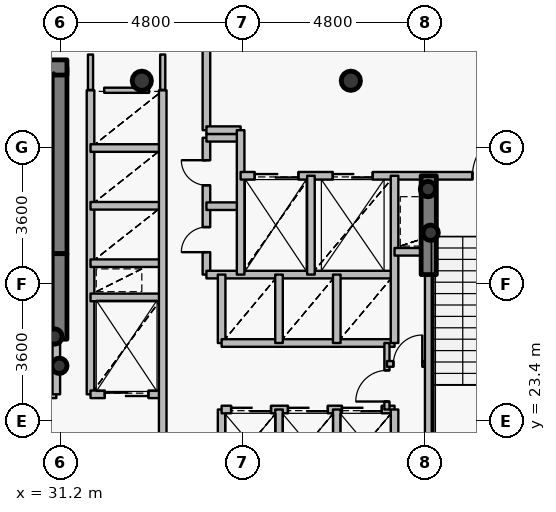
"""IFC4 building model, lengths in metres.
Left out: names, types, materials, properties, quantities, classifications, styles, units other than length and angle.
Written with IfcOpenShell. Run it as: python <this file> out.ifc"""

import sys

from ifc_helpers import new_model, si_unit, direction, frame, frame_2d, origin, origin_2d, place, context, subcontext, project, spatial, rectangle, hollow_circle, extrude, source, transform, mapped, element, fill, save


model = new_model("IFC4")
c1 = context("Model", 3, precision=1e-05, world=origin(), true_north=direction((0.0, 1.0)))
c2 = subcontext(c1, "Body", "Model", "MODEL_VIEW")
j1 = project(units=[si_unit("LENGTHUNIT", "METRE"), si_unit("PLANEANGLEUNIT", "RADIAN")], contexts=[c1])
p1 = place(None, origin())
s1 = spatial("IfcSite", under=j1, at=p1, CompositionType="ELEMENT")
p2 = place(p1, origin())
s2 = spatial("IfcBuilding", under=s1, at=p2, CompositionType="ELEMENT")
p3 = place(p2, frame((0.0, 0.0, 45.0)))
s3 = spatial("IfcBuildingStorey", under=s2, at=p3, CompositionType="ELEMENT", Elevation=45.0)
for number, where, z_axis, x_axis in (
    (1, (38.85, 32.35, 0.0), (0.0, 0.0, 1.0), (1.0, 0.0, 0.0)),
    (2, (33.35, 32.35, 0.0), (0.0, 0.0, 1.0), (1.0, 0.0, 0.0)),
):
    element("IfcColumn", number, at=place(p3, frame(where, z_axis=z_axis, x_axis=x_axis)), inside=s3, PredefinedType="COLUMN", context=c2, shape_type="SweptSolid", body=[
        extrude(hollow_circle(Radius=0.254, WallThickness=0.02, at=origin_2d()), origin(), (0.0, 0.0, 1.0), 4.2),
    ])
p4 = place(p3, frame((31.18, 27.8, 0.0), z_axis=(0.0, 0.0, 1.0), x_axis=(0.0, 1.0, 0.0)))
e3 = element("IfcWall", 3, at=p4, inside=s3, PredefinedType="SHEAR", context=c2, shape_type="SweptSolid", body=[
    extrude(rectangle(XDim=4.9, YDim=0.4, at=frame_2d((2.45, 0.0))), origin(), (0.0, 0.0, 1.0), 4.2),
])
p5 = place(p3, frame((27.28, 32.7, 0.0), z_axis=(0.0, 0.0, 1.0), x_axis=(1.0, 0.0, 0.0)))
e4 = element("IfcWall", 4, at=p5, inside=s3, PredefinedType="SHEAR", context=c2, shape_type="SweptSolid", body=[
    extrude(rectangle(XDim=4.1, YDim=0.4, at=frame_2d((2.05, 0.0))), origin(), (0.0, 0.0, 1.0), 4.2),
])
for number, where, z_axis, x_axis in (
    (5, (31.05, 25.62, 0.0), (0.0, 0.0, 1.0), (1.0, 0.0, 0.0)),
    (6, (31.18, 24.85, 0.0), (0.0, 0.0, 1.0), (1.0, 0.0, 0.0)),
    (7, (40.95, 28.35, 0.0), (0.0, 0.0, 1.0), (1.0, 0.0, 0.0)),
    (8, (40.88, 29.5, 0.0), (0.0, 0.0, 1.0), (1.0, 0.0, 0.0)),
):
    element("IfcColumn", number, at=place(p3, frame(where, z_axis=z_axis, x_axis=x_axis)), inside=s3, PredefinedType="COLUMN", context=c2, shape_type="SweptSolid", body=[
        extrude(hollow_circle(Radius=0.203, WallThickness=0.016, at=origin_2d()), origin(), (0.0, 0.0, 1.0), 4.2),
    ])
p6 = place(p3, frame((31.18, 25.55, 0.0), z_axis=(0.0, 0.0, 1.0), x_axis=(0.0, 1.0, 0.0)))
e9 = element("IfcWall", 9, at=p6, inside=s3, PredefinedType="SHEAR", context=c2, shape_type="SweptSolid", body=[
    extrude(rectangle(XDim=2.25, YDim=0.4, at=frame_2d((1.125, 0.0))), origin(), (0.0, 0.0, 1.0), 3.55),
])
p7 = place(p3, frame((40.9, 27.25, 0.0), z_axis=(0.0, 0.0, 1.0), x_axis=(0.0, 1.0, 0.0)))
e10 = element("IfcWall", 10, at=p7, inside=s3, PredefinedType="SHEAR", context=c2, shape_type="SweptSolid", body=[
    extrude(rectangle(XDim=2.6, YDim=0.4, at=frame_2d((1.3, 0.0))), origin(), (0.0, 0.0, 1.0), 3.55),
])
p8 = place(p3, frame((27.56, 24.1, 0.0), z_axis=(0.0, 0.0, 1.0), x_axis=(1.0, 0.0, 0.0)))
e11 = element("IfcWall", 11, at=p8, inside=s3, PredefinedType="PARTITIONING", context=c2, shape_type="SweptSolid", body=[
    extrude(rectangle(XDim=3.54, YDim=0.2, at=frame_2d((1.77, 0.0))), origin(), (0.0, 0.0, 1.0), 3.95),
])
p9 = place(p8, frame((1.17, 0.0, 0.0)))
e12 = element("IfcOpeningElement", 12, at=p9, cuts=e11, PredefinedType="OPENING", context=c2, shape_type="SweptSolid", body=[
    extrude(rectangle(XDim=1.2, YDim=2.15, at=origin_2d()), frame((0.6, 0.11, 1.075), z_axis=(0.0, -1.0, 0.0), x_axis=(1.0, 0.0, 0.0)), (0.0, 0.0, 1.0), 0.22),
])
p10 = place(p3, frame((31.1, 24.1, 0.0), z_axis=(0.0, 0.0, 1.0), x_axis=(0.0, 1.0, 0.0)))
e13 = element("IfcWall", 13, at=p10, inside=s3, PredefinedType="PARTITIONING", context=c2, shape_type="SweptSolid", body=[
    extrude(rectangle(XDim=1.44, YDim=0.2, at=frame_2d((0.72, 0.0))), origin(), (0.0, 0.0, 1.0), 3.95),
])
p11 = place(p3, frame((32.0, 24.1, 0.0), z_axis=(0.0, 0.0, 1.0), x_axis=(0.0, 1.0, 0.0)))
e14 = element("IfcWall", 14, at=p11, inside=s3, PredefinedType="PARTITIONING", context=c2, shape_type="SweptSolid", body=[
    extrude(rectangle(XDim=8.0, YDim=0.2, at=frame_2d((4.0, 0.0))), origin(), (0.0, 0.0, 1.0), 3.95),
])
p12 = place(p3, frame((32.0, 24.1, 0.0), z_axis=(0.0, 0.0, 1.0), x_axis=(1.0, 0.0, 0.0)))
e15 = element("IfcWall", 15, at=p12, inside=s3, PredefinedType="PARTITIONING", context=c2, shape_type="SweptSolid", body=[
    extrude(rectangle(XDim=1.9, YDim=0.2, at=frame_2d((0.95, 0.0))), origin(), (0.0, 0.0, 1.0), 3.535),
])
p13 = place(p12, frame((0.375, 0.0, 0.0)))
e16 = element("IfcOpeningElement", 16, at=p13, cuts=e15, PredefinedType="OPENING", context=c2, shape_type="SweptSolid", body=[
    extrude(rectangle(XDim=1.15, YDim=2.15, at=origin_2d()), frame((0.575, 0.11, 1.075), z_axis=(0.0, -1.0, 0.0), x_axis=(1.0, 0.0, 0.0)), (0.0, 0.0, 1.0), 0.22),
])
for number, where, z_axis, x_axis in (
    (17, (32.0, 26.65, 0.0), (0.0, 0.0, 1.0), (1.0, 0.0, 0.0)),
    (18, (32.0, 27.55, 0.0), (0.0, 0.0, 1.0), (1.0, 0.0, 0.0)),
    (19, (32.0, 29.06, 0.0), (0.0, 0.0, 1.0), (1.0, 0.0, 0.0)),
    (20, (32.0, 30.58, 0.0), (0.0, 0.0, 1.0), (1.0, 0.0, 0.0)),
):
    element("IfcWall", number, at=place(p3, frame(where, z_axis=z_axis, x_axis=x_axis)), inside=s3, PredefinedType="PARTITIONING", context=c2, shape_type="SweptSolid", body=[
        extrude(rectangle(XDim=1.9, YDim=0.2, at=frame_2d((0.95, 0.0))), origin(), (0.0, 0.0, 1.0), 3.535),
    ])
p14 = place(p3, frame((33.9, 20.7, 0.0), z_axis=(0.0, 0.0, 1.0), x_axis=(0.0, 1.0, 0.0)))
e21 = element("IfcWall", 21, at=p14, inside=s3, PredefinedType="PARTITIONING", context=c2, shape_type="SweptSolid", body=[
    extrude(rectangle(XDim=11.4, YDim=0.2, at=frame_2d((5.7, 0.0))), origin(), (0.0, 0.0, 1.0), 3.535),
])
p15 = place(p3, frame((35.05, 27.25, 0.0), z_axis=(0.0, 0.0, 1.0), x_axis=(0.0, 1.0, 0.0)))
e22 = element("IfcWall", 22, at=p15, inside=s3, PredefinedType="PARTITIONING", context=c2, shape_type="SweptSolid", body=[
    extrude(rectangle(XDim=3.6, YDim=0.2, at=frame_2d((1.8, 0.0))), origin(), (0.0, 0.0, 1.0), 3.95),
])
p16 = place(p15, frame((0.59, 0.0, 0.0)))
e23 = element("IfcOpeningElement", 23, at=p16, cuts=e22, PredefinedType="OPENING", context=c2, shape_type="SweptSolid", body=[
    extrude(rectangle(XDim=0.66, YDim=2.05, at=origin_2d()), frame((0.33, 0.11, 1.025), z_axis=(0.0, -1.0, 0.0), x_axis=(1.0, 0.0, 0.0)), (0.0, 0.0, 1.0), 0.22),
])
p17 = place(p15, frame((2.35, 0.0, 0.0)))
e24 = element("IfcOpeningElement", 24, at=p17, cuts=e22, PredefinedType="OPENING", context=c2, shape_type="SweptSolid", body=[
    extrude(rectangle(XDim=0.66, YDim=2.05, at=origin_2d()), frame((0.33, 0.11, 1.025), z_axis=(0.0, -1.0, 0.0), x_axis=(1.0, 0.0, 0.0)), (0.0, 0.0, 1.0), 0.22),
])
p18 = place(p3, frame((35.05, 27.25, 0.0), z_axis=(0.0, 0.0, 1.0), x_axis=(1.0, 0.0, 0.0)))
e25 = element("IfcWall", 25, at=p18, inside=s3, PredefinedType="PARTITIONING", context=c2, shape_type="SweptSolid", body=[
    extrude(rectangle(XDim=4.95, YDim=0.2, at=frame_2d((2.475, 0.0))), origin(), (0.0, 0.0, 1.0), 3.535),
])
for number, where, z_axis, x_axis in (
    (26, (35.05, 29.05, 0.0), (0.0, 0.0, 1.0), (1.0, 0.0, 0.0)),
    (27, (35.05, 30.85, 0.0), (0.0, 0.0, 1.0), (1.0, 0.0, 0.0)),
):
    element("IfcWall", number, at=place(p3, frame(where, z_axis=z_axis, x_axis=x_axis)), inside=s3, PredefinedType="PARTITIONING", context=c2, shape_type="SweptSolid", body=[
        extrude(rectangle(XDim=0.9, YDim=0.2, at=frame_2d((0.45, 0.0))), origin(), (0.0, 0.0, 1.0), 3.95),
    ])
p19 = place(p3, frame((35.05, 31.05, 0.0), z_axis=(0.0, 0.0, 1.0), x_axis=(0.0, 1.0, 0.0)))
e28 = element("IfcWall", 28, at=p19, inside=s3, PredefinedType="PARTITIONING", context=c2, shape_type="SweptSolid", body=[
    extrude(rectangle(XDim=2.25, YDim=0.2, at=frame_2d((1.125, 0.0))), origin(), (0.0, 0.0, 1.0), 3.535),
])
p20 = place(p3, frame((35.05, 31.05, 0.0), z_axis=(0.0, 0.0, 1.0), x_axis=(1.0, 0.0, 0.0)))
e29 = element("IfcWall", 29, at=p20, inside=s3, PredefinedType="PARTITIONING", context=c2, shape_type="SweptSolid", body=[
    extrude(rectangle(XDim=0.9, YDim=0.2, at=frame_2d((0.45, 0.0))), origin(), (0.0, 0.0, 1.0), 3.95),
])
p21 = place(p3, frame((35.45, 21.9, 0.0), z_axis=(0.0, 0.0, 1.0), x_axis=(0.0, 1.0, 0.0)))
e30 = element("IfcWall", 30, at=p21, inside=s3, PredefinedType="PARTITIONING", context=c2, shape_type="SweptSolid", body=[
    extrude(rectangle(XDim=1.8, YDim=0.2, at=frame_2d((0.9, 0.0))), origin(), (0.0, 0.0, 1.0), 3.95),
])
p22 = place(p3, frame((35.45, 23.7, 0.0), z_axis=(0.0, 0.0, 1.0), x_axis=(1.0, 0.0, 0.0)))
e31 = element("IfcWall", 31, at=p22, inside=s3, PredefinedType="PARTITIONING", context=c2, shape_type="SweptSolid", body=[
    extrude(rectangle(XDim=4.55, YDim=0.2, at=frame_2d((2.275, 0.0))), origin(), (0.0, 0.0, 1.0), 3.535),
])
p23 = place(p22, frame((0.25, 0.0, 0.0)))
e32 = element("IfcOpeningElement", 32, at=p23, cuts=e31, PredefinedType="OPENING", context=c2, shape_type="SweptSolid", body=[
    extrude(rectangle(XDim=1.05, YDim=2.15, at=origin_2d()), frame((0.525, 0.11, 1.075), z_axis=(0.0, -1.0, 0.0), x_axis=(1.0, 0.0, 0.0)), (0.0, 0.0, 1.0), 0.22),
])
p24 = place(p22, frame((1.745, 0.0, 0.0)))
e33 = element("IfcOpeningElement", 33, at=p24, cuts=e31, PredefinedType="OPENING", context=c2, shape_type="SweptSolid", body=[
    extrude(rectangle(XDim=1.05, YDim=2.15, at=origin_2d()), frame((0.525, 0.11, 1.075), z_axis=(0.0, -1.0, 0.0), x_axis=(1.0, 0.0, 0.0)), (0.0, 0.0, 1.0), 0.22),
])
p25 = place(p22, frame((3.165, 0.0, 0.0)))
e34 = element("IfcOpeningElement", 34, at=p25, cuts=e31, PredefinedType="OPENING", context=c2, shape_type="SweptSolid", body=[
    extrude(rectangle(XDim=1.05, YDim=2.15, at=origin_2d()), frame((0.525, 0.11, 1.075), z_axis=(0.0, -1.0, 0.0), x_axis=(1.0, 0.0, 0.0)), (0.0, 0.0, 1.0), 0.22),
])
p26 = place(p3, frame((35.45, 25.45, 0.0), z_axis=(0.0, 0.0, 1.0), x_axis=(0.0, 1.0, 0.0)))
e35 = element("IfcWall", 35, at=p26, inside=s3, PredefinedType="PARTITIONING", context=c2, shape_type="SweptSolid", body=[
    extrude(rectangle(XDim=1.8, YDim=0.2, at=frame_2d((0.9, 0.0))), origin(), (0.0, 0.0, 1.0), 3.95),
])
p27 = place(p3, frame((35.45, 25.45, 0.0), z_axis=(0.0, 0.0, 1.0), x_axis=(1.0, 0.0, 0.0)))
e36 = element("IfcWall", 36, at=p27, inside=s3, PredefinedType="PARTITIONING", context=c2, shape_type="SweptSolid", body=[
    extrude(rectangle(XDim=4.55, YDim=0.2, at=frame_2d((2.275, 0.0))), origin(), (0.0, 0.0, 1.0), 3.535),
])
p28 = place(p3, frame((35.95, 27.25, 0.0), z_axis=(0.0, 0.0, 1.0), x_axis=(0.0, 1.0, 0.0)))
e37 = element("IfcWall", 37, at=p28, inside=s3, PredefinedType="PARTITIONING", context=c2, shape_type="SweptSolid", body=[
    extrude(rectangle(XDim=3.8, YDim=0.2, at=frame_2d((1.9, 0.0))), origin(), (0.0, 0.0, 1.0), 3.95),
])
p29 = place(p3, frame((35.95, 29.85, 0.0), z_axis=(0.0, 0.0, 1.0), x_axis=(1.0, 0.0, 0.0)))
e38 = element("IfcWall", 38, at=p29, inside=s3, PredefinedType="PARTITIONING", context=c2, shape_type="SweptSolid", body=[
    extrude(rectangle(XDim=8.49, YDim=0.2, at=frame_2d((4.245, 0.0))), origin(), (0.0, 0.0, 1.0), 3.535),
])
p30 = place(p29, frame((6.1, 0.0, 0.0)))
e39 = element("IfcOpeningElement", 39, at=p30, cuts=e38, PredefinedType="OPENING", context=c2, shape_type="SweptSolid", body=[
    extrude(rectangle(XDim=1.2, YDim=2.15, at=origin_2d()), frame((0.6, 0.11, 1.075), z_axis=(0.0, -1.0, 0.0), x_axis=(1.0, 0.0, 0.0)), (0.0, 0.0, 1.0), 0.22),
])
p31 = place(p29, frame((0.37, 0.0, 0.0)))
e40 = element("IfcOpeningElement", 40, at=p31, cuts=e38, PredefinedType="OPENING", context=c2, shape_type="SweptSolid", body=[
    extrude(rectangle(XDim=1.15, YDim=2.15, at=origin_2d()), frame((0.575, 0.11, 1.075), z_axis=(0.0, -1.0, 0.0), x_axis=(1.0, 0.0, 0.0)), (0.0, 0.0, 1.0), 0.22),
])
p32 = place(p29, frame((2.425, 0.0, 0.0)))
e41 = element("IfcOpeningElement", 41, at=p32, cuts=e38, PredefinedType="OPENING", context=c2, shape_type="SweptSolid", body=[
    extrude(rectangle(XDim=1.05, YDim=2.15, at=origin_2d()), frame((0.525, 0.11, 1.075), z_axis=(0.0, -1.0, 0.0), x_axis=(1.0, 0.0, 0.0)), (0.0, 0.0, 1.0), 0.22),
])
for number, where, z_axis, x_axis in (
    (42, (36.96, 21.9, 0.0), (0.0, 0.0, 1.0), (0.0, 1.0, 0.0)),
    (43, (36.96, 25.45, 0.0), (0.0, 0.0, 1.0), (0.0, 1.0, 0.0)),
):
    element("IfcWall", number, at=place(p3, frame(where, z_axis=z_axis, x_axis=x_axis)), inside=s3, PredefinedType="PARTITIONING", context=c2, shape_type="SweptSolid", body=[
        extrude(rectangle(XDim=1.8, YDim=0.2, at=frame_2d((0.9, 0.0))), origin(), (0.0, 0.0, 1.0), 3.95),
    ])
p33 = place(p3, frame((37.8, 27.25, 0.0), z_axis=(0.0, 0.0, 1.0), x_axis=(0.0, 1.0, 0.0)))
e44 = element("IfcWall", 44, at=p33, inside=s3, PredefinedType="PARTITIONING", context=c2, shape_type="SweptSolid", body=[
    extrude(rectangle(XDim=2.6, YDim=0.2, at=frame_2d((1.3, 0.0))), origin(), (0.0, 0.0, 1.0), 3.95),
])
for number, where, z_axis, x_axis in (
    (45, (38.48, 21.9, 0.0), (0.0, 0.0, 1.0), (0.0, 1.0, 0.0)),
    (46, (38.48, 25.45, 0.0), (0.0, 0.0, 1.0), (0.0, 1.0, 0.0)),
):
    element("IfcWall", number, at=place(p3, frame(where, z_axis=z_axis, x_axis=x_axis)), inside=s3, PredefinedType="PARTITIONING", context=c2, shape_type="SweptSolid", body=[
        extrude(rectangle(XDim=1.8, YDim=0.2, at=frame_2d((0.9, 0.0))), origin(), (0.0, 0.0, 1.0), 3.95),
    ])
p34 = place(p3, frame((39.8, 23.7, 0.0), z_axis=(0.0, 0.0, 1.0), x_axis=(0.0, 1.0, 0.0)))
e47 = element("IfcWall", 47, at=p34, inside=s3, PredefinedType="PARTITIONING", context=c2, shape_type="SweptSolid", body=[
    extrude(rectangle(XDim=1.75, YDim=0.135, at=frame_2d((0.875, 0.0))), origin(), (0.0, 0.0, 1.0), 3.95),
])
p35 = place(p34, frame((0.21, 0.0, 0.0)))
e48 = element("IfcOpeningElement", 48, at=p35, cuts=e47, PredefinedType="OPENING", context=c2, shape_type="SweptSolid", body=[
    extrude(rectangle(XDim=0.82, YDim=2.1, at=origin_2d()), frame((0.41, 0.078, 1.05), z_axis=(0.0, -1.0, 0.0), x_axis=(1.0, 0.0, 0.0)), (0.0, 0.0, 1.0), 0.155),
])
p36 = place(p3, frame((39.8, 24.9, 0.0), z_axis=(0.0, 0.0, 1.0), x_axis=(1.0, 0.0, 0.0)))
e49 = element("IfcWall", 49, at=p36, inside=s3, PredefinedType="PARTITIONING", context=c2, shape_type="SweptSolid", body=[
    extrude(rectangle(XDim=1.1, YDim=0.15, at=frame_2d((0.55, 0.0))), origin(), (0.0, 0.0, 1.0), 3.95),
])
p37 = place(p36, frame((0.17, 0.0, 0.0)))
e50 = element("IfcOpeningElement", 50, at=p37, cuts=e49, PredefinedType="OPENING", context=c2, shape_type="SweptSolid", body=[
    extrude(rectangle(XDim=0.76, YDim=2.1, at=origin_2d()), frame((0.38, 0.085, 1.05), z_axis=(0.0, -1.0, 0.0), x_axis=(1.0, 0.0, 0.0)), (0.0, 0.0, 1.0), 0.17),
])
p38 = place(p3, frame((40.0, 21.9, 0.0), z_axis=(0.0, 0.0, 1.0), x_axis=(0.0, 1.0, 0.0)))
e51 = element("IfcWall", 51, at=p38, inside=s3, PredefinedType="PARTITIONING", context=c2, shape_type="SweptSolid", body=[
    extrude(rectangle(XDim=1.8, YDim=0.2, at=frame_2d((0.9, 0.0))), origin(), (0.0, 0.0, 1.0), 3.95),
])
p39 = place(p3, frame((40.0, 25.45, 0.0), z_axis=(0.0, 0.0, 1.0), x_axis=(0.0, 1.0, 0.0)))
e52 = element("IfcWall", 52, at=p39, inside=s3, PredefinedType="PARTITIONING", context=c2, shape_type="SweptSolid", body=[
    extrude(rectangle(XDim=4.4, YDim=0.2, at=frame_2d((2.2, 0.0))), origin(), (0.0, 0.0, 1.0), 3.95),
])
p40 = place(p3, frame((40.0, 27.85, 0.0), z_axis=(0.0, 0.0, 1.0), x_axis=(1.0, 0.0, 0.0)))
e53 = element("IfcWall", 53, at=p40, inside=s3, PredefinedType="PARTITIONING", context=c2, shape_type="SweptSolid", body=[
    extrude(rectangle(XDim=0.9, YDim=0.2, at=frame_2d((0.45, 0.0))), origin(), (0.0, 0.0, 1.0), 3.95),
])
p41 = place(p3, frame((40.9, 21.33, 0.0), z_axis=(0.0, 0.0, 1.0), x_axis=(0.0, 1.0, 0.0)))
e54 = element("IfcWall", 54, at=p41, inside=s3, PredefinedType="PARTITIONING", context=c2, shape_type="SweptSolid", body=[
    extrude(rectangle(XDim=5.91, YDim=0.2, at=frame_2d((2.955, 0.0))), origin(), (0.0, 0.0, 1.0), 3.485),
])
p42 = place(p3, frame((32.36, 32.1, 0.0), z_axis=(0.0, 0.0, 1.0), x_axis=(1.0, 0.0, 0.0)))
e55 = element("IfcWall", 55, at=p42, inside=s3, PredefinedType="PARTITIONING", context=c2, shape_type="SweptSolid", body=[
    extrude(rectangle(XDim=1.18, YDim=0.135, at=frame_2d((0.59, 0.0))), origin(), (0.0, 0.0, 1.0), 3.535),
])
p43 = place(p3, frame((32.0, 33.04, 0.0), z_axis=(0.0, 0.0, 1.0), x_axis=(0.0, -1.0, 0.0)))
e56 = element("IfcWall", 56, at=p43, inside=s3, PredefinedType="PARTITIONING", context=c2, shape_type="SweptSolid", body=[
    extrude(rectangle(XDim=0.93, YDim=0.135, at=frame_2d((0.465, 0.0))), origin(), (0.0, 0.0, 1.0), 3.485),
])
p44 = place(p3, frame((33.9, 32.11, 0.0), z_axis=(0.0, 0.0, 1.0), x_axis=(0.0, 1.0, 0.0)))
e57 = element("IfcWall", 57, at=p44, inside=s3, PredefinedType="PARTITIONING", context=c2, shape_type="SweptSolid", body=[
    extrude(rectangle(XDim=0.93, YDim=0.135, at=frame_2d((0.465, 0.0))), origin(), (0.0, 0.0, 1.0), 3.535),
])
m1 = source(origin(), c2, "Body", "SweptSolid", [
    extrude(rectangle(XDim=1.2, YDim=2.15, at=origin_2d()), frame((0.6, 0.025, 1.075), z_axis=(0.0, -1.0, 0.0), x_axis=(1.0, 0.0, 0.0)), (0.0, 0.0, 1.0), 0.05),
])
p45 = place(p30, origin())
e58 = element("IfcDoor", 58, at=p45, inside=s3, OperationType="SINGLE_SWING_RIGHT", PredefinedType="DOOR", context=c2, shape_type="MappedRepresentation", body=[
    mapped(m1, transform((0.0, 0.0, 0.0), x_axis=(1.0, 0.0, 0.0), y_axis=(0.0, 1.0, 0.0), z_axis=(0.0, 0.0, 1.0), scale=1.0)),
])
fill(e39, e58)
m2 = source(origin(), c2, "Body", "SweptSolid", [
    extrude(rectangle(XDim=1.15, YDim=2.15, at=origin_2d()), frame((0.575, 0.025, 1.075), z_axis=(0.0, -1.0, 0.0), x_axis=(1.0, 0.0, 0.0)), (0.0, 0.0, 1.0), 0.05),
])
p46 = place(p31, origin())
e59 = element("IfcDoor", 59, at=p46, inside=s3, OperationType="DOUBLE_DOOR_SLIDING", PredefinedType="USERDEFINED", context=c2, shape_type="MappedRepresentation", body=[
    mapped(m2, transform((0.0, 0.0, 0.0), x_axis=(1.0, 0.0, 0.0), y_axis=(0.0, 1.0, 0.0), z_axis=(0.0, 0.0, 1.0), scale=1.0)),
])
fill(e40, e59)
p47 = place(p13, origin())
e60 = element("IfcDoor", 60, at=p47, inside=s3, OperationType="DOUBLE_DOOR_SLIDING", PredefinedType="USERDEFINED", context=c2, shape_type="MappedRepresentation", body=[
    mapped(m2, transform((0.0, 0.0, 0.0), x_axis=(1.0, 0.0, 0.0), y_axis=(0.0, 1.0, 0.0), z_axis=(0.0, 0.0, 1.0), scale=1.0)),
])
fill(e16, e60)
m3 = source(origin(), c2, "Body", "SweptSolid", [
    extrude(rectangle(XDim=1.05, YDim=2.15, at=origin_2d()), frame((0.525, 0.025, 1.075), z_axis=(0.0, -1.0, 0.0), x_axis=(1.0, 0.0, 0.0)), (0.0, 0.0, 1.0), 0.05),
])
p48 = place(p32, origin())
e61 = element("IfcDoor", 61, at=p48, inside=s3, OperationType="DOUBLE_DOOR_SLIDING", PredefinedType="USERDEFINED", context=c2, shape_type="MappedRepresentation", body=[
    mapped(m3, transform((0.0, 0.0, 0.0), x_axis=(1.0, 0.0, 0.0), y_axis=(0.0, 1.0, 0.0), z_axis=(0.0, 0.0, 1.0), scale=1.0)),
])
fill(e41, e61)
p49 = place(p23, origin())
e62 = element("IfcDoor", 62, at=p49, inside=s3, OperationType="DOUBLE_DOOR_SLIDING", PredefinedType="USERDEFINED", context=c2, shape_type="MappedRepresentation", body=[
    mapped(m3, transform((0.0, 0.0, 0.0), x_axis=(1.0, 0.0, 0.0), y_axis=(0.0, 1.0, 0.0), z_axis=(0.0, 0.0, 1.0), scale=1.0)),
])
fill(e32, e62)
p50 = place(p24, origin())
e63 = element("IfcDoor", 63, at=p50, inside=s3, OperationType="DOUBLE_DOOR_SLIDING", PredefinedType="USERDEFINED", context=c2, shape_type="MappedRepresentation", body=[
    mapped(m3, transform((0.0, 0.0, 0.0), x_axis=(1.0, 0.0, 0.0), y_axis=(0.0, 1.0, 0.0), z_axis=(0.0, 0.0, 1.0), scale=1.0)),
])
fill(e33, e63)
p51 = place(p25, origin())
e64 = element("IfcDoor", 64, at=p51, inside=s3, OperationType="DOUBLE_DOOR_SLIDING", PredefinedType="USERDEFINED", context=c2, shape_type="MappedRepresentation", body=[
    mapped(m3, transform((0.0, 0.0, 0.0), x_axis=(1.0, 0.0, 0.0), y_axis=(0.0, 1.0, 0.0), z_axis=(0.0, 0.0, 1.0), scale=1.0)),
])
fill(e34, e64)
m4 = source(origin(), c2, "Body", "SweptSolid", [
    extrude(rectangle(XDim=0.66, YDim=2.05, at=origin_2d()), frame((0.33, 0.025, 1.025), z_axis=(0.0, -1.0, 0.0), x_axis=(1.0, 0.0, 0.0)), (0.0, 0.0, 1.0), 0.05),
])
p52 = place(p16, origin())
e65 = element("IfcDoor", 65, at=p52, inside=s3, OperationType="SINGLE_SWING_LEFT", PredefinedType="USERDEFINED", context=c2, shape_type="MappedRepresentation", body=[
    mapped(m4, transform((0.0, 0.0, 0.0), x_axis=(1.0, 0.0, 0.0), y_axis=(0.0, 1.0, 0.0), z_axis=(0.0, 0.0, 1.0), scale=1.0)),
])
fill(e23, e65)
p53 = place(p17, origin())
e66 = element("IfcDoor", 66, at=p53, inside=s3, OperationType="SINGLE_SWING_RIGHT", PredefinedType="USERDEFINED", context=c2, shape_type="MappedRepresentation", body=[
    mapped(m4, transform((0.0, 0.0, 0.0), x_axis=(1.0, 0.0, 0.0), y_axis=(0.0, 1.0, 0.0), z_axis=(0.0, 0.0, 1.0), scale=1.0)),
])
fill(e24, e66)
m5 = source(origin(), c2, "Body", "SweptSolid", [
    extrude(rectangle(XDim=0.82, YDim=2.1, at=origin_2d()), frame((0.41, 0.025, 1.05), z_axis=(0.0, -1.0, 0.0), x_axis=(1.0, 0.0, 0.0)), (0.0, 0.0, 1.0), 0.05),
])
p54 = place(p35, origin())
e67 = element("IfcDoor", 67, at=p54, inside=s3, OperationType="SINGLE_SWING_LEFT", PredefinedType="DOOR", context=c2, shape_type="MappedRepresentation", body=[
    mapped(m5, transform((0.0, 0.0, 0.0), x_axis=(1.0, 0.0, 0.0), y_axis=(0.0, 1.0, 0.0), z_axis=(0.0, 0.0, 1.0), scale=1.0)),
])
fill(e48, e67)
m6 = source(origin(), c2, "Body", "SweptSolid", [
    extrude(rectangle(XDim=0.76, YDim=2.1, at=origin_2d()), frame((0.38, 0.025, 1.05), z_axis=(0.0, -1.0, 0.0), x_axis=(1.0, 0.0, 0.0)), (0.0, 0.0, 1.0), 0.05),
])
p55 = place(p37, origin())
e68 = element("IfcDoor", 68, at=p55, inside=s3, OperationType="SINGLE_SWING_RIGHT", PredefinedType="DOOR", context=c2, shape_type="MappedRepresentation", body=[
    mapped(m6, transform((0.0, 0.0, 0.0), x_axis=(1.0, 0.0, 0.0), y_axis=(0.0, 1.0, 0.0), z_axis=(0.0, 0.0, 1.0), scale=1.0)),
])
fill(e50, e68)
save(model, sys.argv[1])
